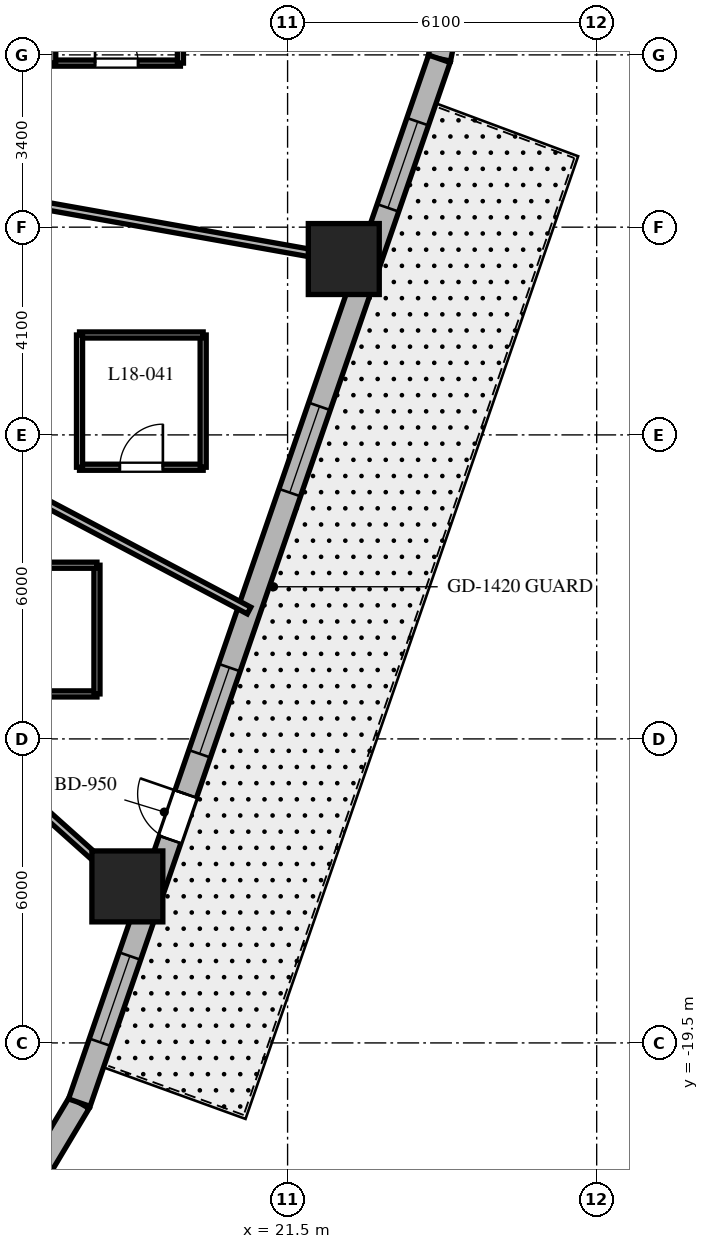
"""IFC4 building model, lengths in metres.
Left out: names, types, materials, properties, quantities, classifications, styles, units other than length and angle.
Written with IfcOpenShell. Run it as: python <this file> out.ifc"""

import sys

from ifc_helpers import new_model, si_unit, direction, frame, frame_2d, origin, origin_2d, place, context, subcontext, project, spatial, rectangle, extrude, element, fill, save


model = new_model("IFC4")
c1 = context("Model", 3, precision=1e-05, world=origin(), true_north=direction((0.0, 1.0)))
c2 = subcontext(c1, "Body", "Model", "MODEL_VIEW")
j1 = project(units=[si_unit("LENGTHUNIT", "METRE"), si_unit("PLANEANGLEUNIT", "RADIAN")], contexts=[c1])
p1 = place(None, origin())
s1 = spatial("IfcSite", under=j1, at=p1, CompositionType="ELEMENT")
p2 = place(p1, origin())
s2 = spatial("IfcBuilding", under=s1, at=p2, CompositionType="ELEMENT")
p3 = place(p2, frame((0.0, 0.0, 78.6)))
s3 = spatial("IfcBuildingStorey", under=s2, at=p3, CompositionType="ELEMENT", Elevation=78.6)
for number, where, z_axis, x_axis in (
    (1, (18.338, -16.411, 0.0), (0.0, 0.0, 1.0), (1.0, 0.0, 0.0)),
    (2, (22.609, -4.029, 0.0), (0.0, 0.0, 1.0), (1.0, 0.0, 0.0)),
):
    element("IfcColumn", number, at=place(p3, frame(where, z_axis=z_axis, x_axis=x_axis)), inside=s3, PredefinedType="COLUMN", context=c2, shape_type="SweptSolid", body=[
        extrude(rectangle(XDim=1.4, YDim=1.4, at=origin_2d()), origin(), (0.0, 0.0, 1.0), 3.7),
    ])
p4 = place(p3, frame((16.669, -21.885, 0.0), z_axis=(0.0, 0.0, 1.0), x_axis=(0.512936712947, 0.858426425799, 0.0)))
e3 = element("IfcWall", 3, at=p4, inside=s3, PredefinedType="SOLIDWALL", context=c2, shape_type="SweptSolid", body=[
    extrude(rectangle(XDim=1.406, YDim=0.45, at=frame_2d((0.703, 0.0))), origin(), (0.0, 0.0, 1.0), 3.4),
])
p5 = place(p3, frame((24.496, -0.077, 0.0), z_axis=(0.0, 0.0, 1.0), x_axis=(0.199570594521, 0.979883451132, 0.0)))
e4 = element("IfcWall", 4, at=p5, inside=s3, PredefinedType="SOLIDWALL", context=c2, shape_type="SweptSolid", body=[
    extrude(rectangle(XDim=0.897, YDim=0.45, at=frame_2d((0.448, 0.0))), origin(), (0.0, 0.0, 1.0), 3.4),
])
p6 = place(p3, frame((17.39, -20.678, 0.0), z_axis=(0.0, 0.0, 1.0), x_axis=(0.326068018294, 0.945346310854, 0.0)))
e5 = element("IfcWall", 5, at=p6, inside=s3, PredefinedType="SOLIDWALL", context=c2, shape_type="SweptSolid", body=[
    extrude(rectangle(XDim=21.793, YDim=0.45, at=frame_2d((10.896, 0.0))), origin(), (0.0, 0.0, 1.0), 3.4),
])
p7 = place(p6, frame((5.493, 0.0, 0.0)))
e6 = element("IfcOpeningElement", 6, at=p7, cuts=e5, PredefinedType="OPENING", context=c2, shape_type="SweptSolid", body=[
    extrude(rectangle(XDim=0.95, YDim=2.15, at=frame_2d((0.475, 1.075))), frame((0.0, 0.235, 0.0), z_axis=(0.0, -1.0, 0.0), x_axis=(1.0, 0.0, 0.0)), (0.0, 0.0, 1.0), 0.47),
])
p8 = place(p6, frame((1.26, 0.0, 0.8)))
e7 = element("IfcOpeningElement", 7, at=p8, cuts=e5, PredefinedType="OPENING", context=c2, shape_type="SweptSolid", body=[
    extrude(rectangle(XDim=1.8, YDim=1.8, at=frame_2d((0.9, 0.9))), frame((0.0, 0.235, 0.0), z_axis=(0.0, -1.0, 0.0), x_axis=(1.0, 0.0, 0.0)), (0.0, 0.0, 1.0), 0.47),
])
p9 = place(p6, frame((7.283, 0.0, 0.8)))
e8 = element("IfcOpeningElement", 8, at=p9, cuts=e5, PredefinedType="OPENING", context=c2, shape_type="SweptSolid", body=[
    extrude(rectangle(XDim=1.8, YDim=1.8, at=frame_2d((0.9, 0.9))), frame((0.0, 0.235, 0.0), z_axis=(0.0, -1.0, 0.0), x_axis=(1.0, 0.0, 0.0)), (0.0, 0.0, 1.0), 0.47),
])
p10 = place(p6, frame((12.736, 0.0, 0.8)))
e9 = element("IfcOpeningElement", 9, at=p10, cuts=e5, PredefinedType="OPENING", context=c2, shape_type="SweptSolid", body=[
    extrude(rectangle(XDim=1.8, YDim=1.8, at=frame_2d((0.9, 0.9))), frame((0.0, 0.235, 0.0), z_axis=(0.0, -1.0, 0.0), x_axis=(1.0, 0.0, 0.0)), (0.0, 0.0, 1.0), 0.47),
])
p11 = place(p6, frame((18.68, 0.0, 0.8)))
e10 = element("IfcOpeningElement", 10, at=p11, cuts=e5, PredefinedType="OPENING", context=c2, shape_type="SweptSolid", body=[
    extrude(rectangle(XDim=1.8, YDim=1.8, at=frame_2d((0.9, 0.9))), frame((0.0, 0.235, 0.0), z_axis=(0.0, -1.0, 0.0), x_axis=(1.0, 0.0, 0.0)), (0.0, 0.0, 1.0), 0.47),
])
p12 = place(p3, frame((11.007, -9.85, 0.0), z_axis=(0.0, 0.0, 1.0), x_axis=(0.745177305978, -0.666866390407, 0.0)))
e11 = element("IfcWall", 11, at=p12, inside=s3, PredefinedType="PARTITIONING", context=c2, shape_type="SweptSolid", body=[
    extrude(rectangle(XDim=10.375, YDim=0.15, at=frame_2d((5.188, 0.0))), origin(), (0.0, 0.0, 1.0), 2.54),
])
p13 = place(p3, frame((11.35, -6.001, 0.0), z_axis=(0.0, 0.0, 1.0), x_axis=(0.884022077319, -0.467445148453, 0.0)))
e12 = element("IfcWall", 12, at=p13, inside=s3, PredefinedType="PARTITIONING", context=c2, shape_type="SweptSolid", body=[
    extrude(rectangle(XDim=10.621, YDim=0.15, at=frame_2d((5.311, 0.0))), origin(), (0.0, 0.0, 1.0), 2.54),
])
p14 = place(p3, frame((11.35, -2.023, 0.0), z_axis=(0.0, 0.0, 1.0), x_axis=(0.984493741877, -0.17541970301, 0.0)))
e13 = element("IfcWall", 13, at=p14, inside=s3, PredefinedType="PARTITIONING", context=c2, shape_type="SweptSolid", body=[
    extrude(rectangle(XDim=11.937, YDim=0.15, at=frame_2d((5.969, 0.0))), origin(), (0.0, 0.0, 1.0), 2.54),
])
p15 = place(p3, frame((15.058, -12.612, 0.0), z_axis=(0.0, 0.0, 1.0), x_axis=(1.0, 0.0, 0.0)))
e14 = element("IfcWall", 14, at=p15, inside=s3, PredefinedType="PARTITIONING", context=c2, shape_type="SweptSolid", body=[
    extrude(rectangle(XDim=2.68, YDim=0.12, at=frame_2d((1.34, 0.0))), origin(), (0.0, 0.0, 1.0), 2.972),
])
p16 = place(p15, frame((0.915, 0.0, 0.0)))
e15 = element("IfcOpeningElement", 15, at=p16, cuts=e14, PredefinedType="OPENING", context=c2, shape_type="SweptSolid", body=[
    extrude(rectangle(XDim=0.85, YDim=2.03, at=frame_2d((0.425, 1.015))), frame((0.0, 0.07, 0.0), z_axis=(0.0, -1.0, 0.0), x_axis=(1.0, 0.0, 0.0)), (0.0, 0.0, 1.0), 0.14),
])
p17 = place(p3, frame((17.738, -12.612, 0.0), z_axis=(0.0, 0.0, 1.0), x_axis=(0.0, 1.0, 0.0)))
e16 = element("IfcWall", 16, at=p17, inside=s3, PredefinedType="PARTITIONING", context=c2, shape_type="SweptSolid", body=[
    extrude(rectangle(XDim=2.54, YDim=0.12, at=frame_2d((1.27, 0.0))), origin(), (0.0, 0.0, 1.0), 3.4),
])
p18 = place(p3, frame((17.738, -10.072, 0.0), z_axis=(0.0, 0.0, 1.0), x_axis=(-1.0, 0.0, 0.0)))
e17 = element("IfcWall", 17, at=p18, inside=s3, PredefinedType="PARTITIONING", context=c2, shape_type="SweptSolid", body=[
    extrude(rectangle(XDim=2.68, YDim=0.12, at=frame_2d((1.34, 0.0))), origin(), (0.0, 0.0, 1.0), 2.972),
])
p19 = place(p3, frame((17.394, -8.138, 0.0), z_axis=(0.0, 0.0, 1.0), x_axis=(1.0, 0.0, 0.0)))
e18 = element("IfcWall", 18, at=p19, inside=s3, PredefinedType="PARTITIONING", context=c2, shape_type="SweptSolid", body=[
    extrude(rectangle(XDim=2.44, YDim=0.12, at=frame_2d((1.22, 0.0))), origin(), (0.0, 0.0, 1.0), 3.4),
])
p20 = place(p19, frame((0.795, 0.0, 0.0)))
e19 = element("IfcOpeningElement", 19, at=p20, cuts=e18, PredefinedType="OPENING", context=c2, shape_type="SweptSolid", body=[
    extrude(rectangle(XDim=0.85, YDim=2.03, at=frame_2d((0.425, 1.015))), frame((0.0, 0.07, 0.0), z_axis=(0.0, -1.0, 0.0), x_axis=(1.0, 0.0, 0.0)), (0.0, 0.0, 1.0), 0.14),
])
p21 = place(p3, frame((19.834, -8.138, 0.0), z_axis=(0.0, 0.0, 1.0), x_axis=(0.0, 1.0, 0.0)))
e20 = element("IfcWall", 20, at=p21, inside=s3, PredefinedType="PARTITIONING", context=c2, shape_type="SweptSolid", body=[
    extrude(rectangle(XDim=2.61, YDim=0.12, at=frame_2d((1.305, 0.0))), origin(), (0.0, 0.0, 1.0), 3.4),
])
p22 = place(p3, frame((19.834, -5.528, 0.0), z_axis=(0.0, 0.0, 1.0), x_axis=(-1.0, 0.0, 0.0)))
e21 = element("IfcWall", 21, at=p22, inside=s3, PredefinedType="PARTITIONING", context=c2, shape_type="SweptSolid", body=[
    extrude(rectangle(XDim=2.44, YDim=0.12, at=frame_2d((1.22, 0.0))), origin(), (0.0, 0.0, 1.0), 2.84),
])
p23 = place(p3, frame((17.394, -5.528, 0.0), z_axis=(0.0, 0.0, 1.0), x_axis=(0.0, -1.0, 0.0)))
e22 = element("IfcWall", 22, at=p23, inside=s3, PredefinedType="PARTITIONING", context=c2, shape_type="SweptSolid", body=[
    extrude(rectangle(XDim=2.61, YDim=0.12, at=frame_2d((1.305, 0.0))), origin(), (0.0, 0.0, 1.0), 2.972),
])
p24 = place(p3, frame((16.865, -0.162, 0.0), z_axis=(0.0, 0.0, 1.0), x_axis=(1.0, 0.0, 0.0)))
e23 = element("IfcWall", 23, at=p24, inside=s3, PredefinedType="PARTITIONING", context=c2, shape_type="SweptSolid", body=[
    extrude(rectangle(XDim=2.52, YDim=0.12, at=frame_2d((1.26, 0.0))), origin(), (0.0, 0.0, 1.0), 2.84),
])
p25 = place(p24, frame((0.835, 0.0, 0.0)))
e24 = element("IfcOpeningElement", 24, at=p25, cuts=e23, PredefinedType="OPENING", context=c2, shape_type="SweptSolid", body=[
    extrude(rectangle(XDim=0.85, YDim=2.03, at=frame_2d((0.425, 1.015))), frame((0.0, 0.07, 0.0), z_axis=(0.0, -1.0, 0.0), x_axis=(1.0, 0.0, 0.0)), (0.0, 0.0, 1.0), 0.14),
])
for number, where, z_axis, x_axis in (
    (25, (19.385, -0.162, 0.0), (0.0, 0.0, 1.0), (0.0, 1.0, 0.0)),
    (26, (16.865, 2.518, 0.0), (0.0, 0.0, 1.0), (0.0, -1.0, 0.0)),
):
    element("IfcWall", number, at=place(p3, frame(where, z_axis=z_axis, x_axis=x_axis)), inside=s3, PredefinedType="PARTITIONING", context=c2, shape_type="SweptSolid", body=[
        extrude(rectangle(XDim=2.68, YDim=0.12, at=frame_2d((1.34, 0.0))), origin(), (0.0, 0.0, 1.0), 3.4),
    ])
p26 = place(p7, origin())
e27 = element("IfcDoor", 27, at=p26, inside=s3, OperationType="SINGLE_SWING_RIGHT", PredefinedType="DOOR", context=c2, shape_type="SweptSolid", body=[
    extrude(rectangle(XDim=0.95, YDim=2.15, at=frame_2d((0.475, 1.075))), frame((0.0, 0.025, 0.0), z_axis=(0.0, -1.0, 0.0), x_axis=(1.0, 0.0, 0.0)), (0.0, 0.0, 1.0), 0.05),
])
fill(e6, e27)
p27 = place(p8, origin())
e28 = element("IfcWindow", 28, at=p27, inside=s3, PartitioningType="SINGLE_PANEL", PredefinedType="WINDOW", context=c2, shape_type="SweptSolid", body=[
    extrude(rectangle(XDim=1.8, YDim=1.8, at=frame_2d((0.9, 0.9))), frame((0.0, 0.03, 0.0), z_axis=(0.0, -1.0, 0.0), x_axis=(1.0, 0.0, 0.0)), (0.0, 0.0, 1.0), 0.06),
])
fill(e7, e28)
p28 = place(p9, origin())
e29 = element("IfcWindow", 29, at=p28, inside=s3, PartitioningType="SINGLE_PANEL", PredefinedType="WINDOW", context=c2, shape_type="SweptSolid", body=[
    extrude(rectangle(XDim=1.8, YDim=1.8, at=frame_2d((0.9, 0.9))), frame((0.0, 0.03, 0.0), z_axis=(0.0, -1.0, 0.0), x_axis=(1.0, 0.0, 0.0)), (0.0, 0.0, 1.0), 0.06),
])
fill(e8, e29)
p29 = place(p10, origin())
e30 = element("IfcWindow", 30, at=p29, inside=s3, PartitioningType="SINGLE_PANEL", PredefinedType="WINDOW", context=c2, shape_type="SweptSolid", body=[
    extrude(rectangle(XDim=1.8, YDim=1.8, at=frame_2d((0.9, 0.9))), frame((0.0, 0.03, 0.0), z_axis=(0.0, -1.0, 0.0), x_axis=(1.0, 0.0, 0.0)), (0.0, 0.0, 1.0), 0.06),
])
fill(e9, e30)
p30 = place(p11, origin())
e31 = element("IfcWindow", 31, at=p30, inside=s3, PartitioningType="SINGLE_PANEL", PredefinedType="WINDOW", context=c2, shape_type="SweptSolid", body=[
    extrude(rectangle(XDim=1.8, YDim=1.8, at=frame_2d((0.9, 0.9))), frame((0.0, 0.03, 0.0), z_axis=(0.0, -1.0, 0.0), x_axis=(1.0, 0.0, 0.0)), (0.0, 0.0, 1.0), 0.06),
])
fill(e10, e31)
p31 = place(p20, origin())
e32 = element("IfcDoor", 32, at=p31, inside=s3, OperationType="SINGLE_SWING_RIGHT", PredefinedType="DOOR", context=c2, shape_type="SweptSolid", body=[
    extrude(rectangle(XDim=0.85, YDim=2.03, at=frame_2d((0.425, 1.015))), frame((0.0, 0.025, 0.0), z_axis=(0.0, -1.0, 0.0), x_axis=(1.0, 0.0, 0.0)), (0.0, 0.0, 1.0), 0.05),
])
fill(e19, e32)
p32 = place(p25, origin())
e33 = element("IfcDoor", 33, at=p32, inside=s3, OperationType="SINGLE_SWING_LEFT", PredefinedType="DOOR", context=c2, shape_type="SweptSolid", body=[
    extrude(rectangle(XDim=0.85, YDim=2.03, at=frame_2d((0.425, 1.015))), frame((0.0, 0.025, 0.0), z_axis=(0.0, -1.0, 0.0), x_axis=(1.0, 0.0, 0.0)), (0.0, 0.0, 1.0), 0.05),
])
fill(e24, e33)
save(model, sys.argv[1])
